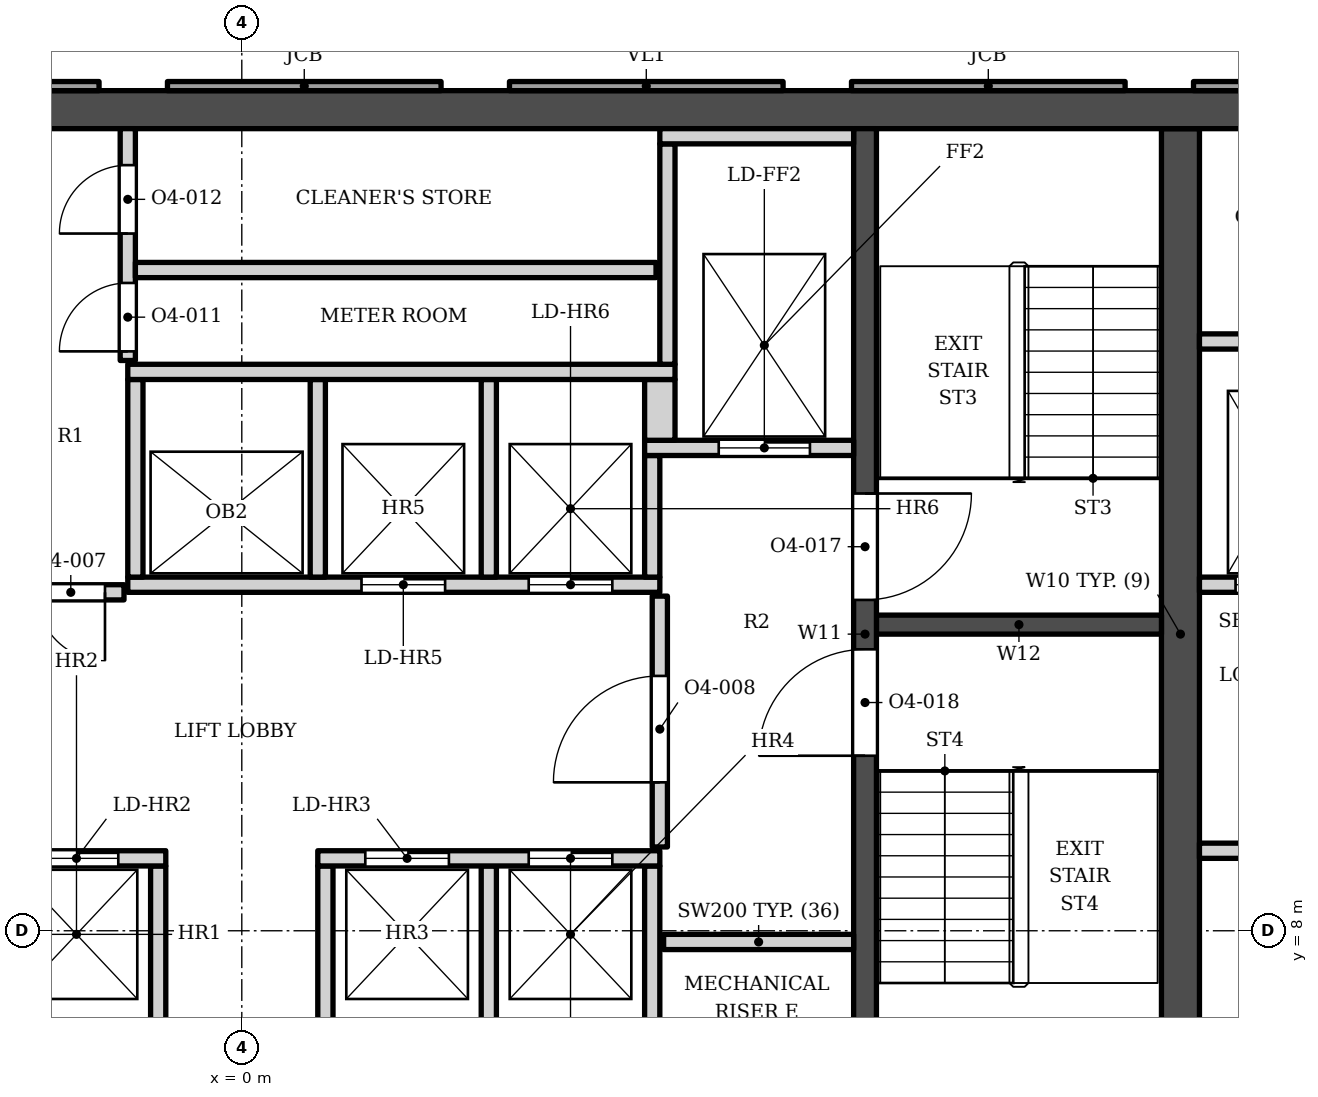
"""IFC4 building model, lengths in metres.
Left out: names, types, materials, properties, quantities, classifications, styles, units other than length and angle.
Written with IfcOpenShell. Run it as: python <this file> out.ifc"""

import sys

from ifc_helpers import new_model, si_unit, direction, frame, frame_2d, origin, place, context, subcontext, project, spatial, polyline, rectangle, outline, extrude, element, fill, save


model = new_model("IFC4")
c1 = context("Model", 3, precision=1e-05, world=origin(), true_north=direction((0.0, 1.0)))
c2 = subcontext(c1, "Body", "Model", "MODEL_VIEW")
j1 = project(units=[si_unit("LENGTHUNIT", "METRE"), si_unit("PLANEANGLEUNIT", "RADIAN")], contexts=[c1])
p1 = place(None, origin())
s1 = spatial("IfcSite", under=j1, at=p1, CompositionType="ELEMENT")
p2 = place(p1, origin())
s2 = spatial("IfcBuilding", under=s1, at=p2, CompositionType="ELEMENT")
p3 = place(p2, frame((0.0, 0.0, 179.7)))
s3 = spatial("IfcBuildingStorey", under=s2, at=p3, CompositionType="ELEMENT", Elevation=179.7)
p4 = place(p3, frame((-15.1, 18.802, 0.0), z_axis=(0.0, 0.0, 1.0), x_axis=(1.0, 0.0, 0.0)))
e1 = element("IfcWall", 1, at=p4, inside=s3, PredefinedType="SHEAR", context=c2, shape_type="SweptSolid", body=[
    extrude(rectangle(XDim=30.2, YDim=0.5, at=frame_2d((15.1, 0.0))), origin(), (0.0, 0.0, 1.0), 3.9),
])
p5 = place(p3, frame((12.35, 5.253, 0.0), z_axis=(0.0, 0.0, 1.0), x_axis=(0.0, 1.0, 0.0)))
e2 = element("IfcWall", 2, at=p5, inside=s3, PredefinedType="SHEAR", context=c2, shape_type="SweptSolid", body=[
    extrude(rectangle(XDim=13.3, YDim=0.5, at=frame_2d((6.65, 0.0))), origin(), (0.0, 0.0, 1.0), 3.9),
])
p6 = place(p3, frame((8.2, 5.253, 0.0), z_axis=(0.0, 0.0, 1.0), x_axis=(0.0, 1.0, 0.0)))
e3 = element("IfcWall", 3, at=p6, inside=s3, PredefinedType="SHEAR", context=c2, shape_type="SweptSolid", body=[
    extrude(rectangle(XDim=13.3, YDim=0.3, at=frame_2d((6.65, 0.0))), origin(), (0.0, 0.0, 1.0), 3.9),
])
p7 = place(p6, frame((7.1, 0.0, 0.0)))
e4 = element("IfcOpeningElement", 4, at=p7, cuts=e3, PredefinedType="OPENING", context=c2, shape_type="SweptSolid", body=[
    extrude(rectangle(XDim=1.4, YDim=2.1, at=frame_2d((0.7, 1.05))), frame((0.0, 0.16, 0.0), z_axis=(0.0, -1.0, 0.0), x_axis=(1.0, 0.0, 0.0)), (0.0, 0.0, 1.0), 0.32),
])
p8 = place(p6, frame((5.05, 0.0, 0.0)))
e5 = element("IfcOpeningElement", 5, at=p8, cuts=e3, PredefinedType="OPENING", context=c2, shape_type="SweptSolid", body=[
    extrude(rectangle(XDim=1.4, YDim=2.1, at=frame_2d((0.7, 1.05))), frame((0.0, 0.16, 0.0), z_axis=(0.0, -1.0, 0.0), x_axis=(1.0, 0.0, 0.0)), (0.0, 0.0, 1.0), 0.32),
])
p9 = place(p3, frame((8.35, 12.028, 0.0), z_axis=(0.0, 0.0, 1.0), x_axis=(1.0, 0.0, 0.0)))
e6 = element("IfcWall", 6, at=p9, inside=s3, PredefinedType="SHEAR", context=c2, shape_type="SweptSolid", body=[
    extrude(rectangle(XDim=3.75, YDim=0.25, at=frame_2d((1.875, 0.0))), origin(), (0.0, 0.0, 1.0), 3.9),
])
p10 = place(p3, origin())
e7 = element("IfcWall", 7, at=p10, inside=s3, PredefinedType="ELEMENTEDWALL", context=c2, shape_type="SweptSolid", body=[
    extrude(outline(polyline([(12.522, 19.173), (12.522, 19.052), (16.121, 19.052), (16.121, 19.173), (12.522, 19.173)])), origin(), (0.0, 0.0, 1.0), 3.0),
])
p11 = place(p3, origin())
e8 = element("IfcWall", 8, at=p11, inside=s3, PredefinedType="SOLIDWALL", context=c2, shape_type="SweptSolid", body=[
    extrude(outline(polyline([(8.022, 19.173), (8.022, 19.052), (11.622, 19.052), (11.622, 19.173), (8.022, 19.173)])), origin(), (0.0, 0.0, 1.0), 3.0),
])
p12 = place(p3, origin())
e9 = element("IfcWall", 9, at=p12, inside=s3, PredefinedType="ELEMENTEDWALL", context=c2, shape_type="SweptSolid", body=[
    extrude(outline(polyline([(3.522, 19.173), (3.522, 19.052), (7.122, 19.052), (7.122, 19.173), (3.522, 19.173)])), origin(), (0.0, 0.0, 1.0), 3.0),
])
p13 = place(p3, origin())
e10 = element("IfcWall", 10, at=p13, inside=s3, PredefinedType="SOLIDWALL", context=c2, shape_type="SweptSolid", body=[
    extrude(outline(polyline([(-0.978, 19.173), (-0.978, 19.052), (2.622, 19.052), (2.622, 19.173), (-0.978, 19.173)])), origin(), (0.0, 0.0, 1.0), 3.0),
])
p14 = place(p3, origin())
e11 = element("IfcWall", 11, at=p14, inside=s3, PredefinedType="ELEMENTEDWALL", context=c2, shape_type="SweptSolid", body=[
    extrude(outline(polyline([(-5.478, 19.173), (-5.478, 19.052), (-1.878, 19.052), (-1.878, 19.173), (-5.478, 19.173)])), origin(), (0.0, 0.0, 1.0), 3.0),
])
for number, where, z_axis, x_axis in (
    (12, (-1.1, 6.353, 0.0), (0.0, 0.0, 1.0), (0.0, 1.0, 0.0)),
    (13, (1.1, 6.353, 0.0), (0.0, 0.0, 1.0), (0.0, 1.0, 0.0)),
    (14, (3.25, 6.353, 0.0), (0.0, 0.0, 1.0), (0.0, 1.0, 0.0)),
    (15, (5.4, 6.353, 0.0), (0.0, 0.0, 1.0), (0.0, 1.0, 0.0)),
    (16, (5.55, 7.853, 0.0), (0.0, 0.0, 1.0), (1.0, 0.0, 0.0)),
):
    element("IfcWall", number, at=place(p3, frame(where, z_axis=z_axis, x_axis=x_axis)), inside=s3, PredefinedType="SOLIDWALL", context=c2, shape_type="SweptSolid", body=[
        extrude(rectangle(XDim=2.5, YDim=0.2, at=frame_2d((1.25, 0.0))), origin(), (0.0, 0.0, 1.0), 3.73),
    ])
p15 = place(p3, frame((-5.5, 8.953, 0.0), z_axis=(0.0, 0.0, 1.0), x_axis=(1.0, 0.0, 0.0)))
e17 = element("IfcWall", 17, at=p15, inside=s3, PredefinedType="SOLIDWALL", context=c2, shape_type="SweptSolid", body=[
    extrude(rectangle(XDim=4.5, YDim=0.2, at=frame_2d((2.25, 0.0))), origin(), (0.0, 0.0, 1.0), 3.73),
])
p16 = place(p15, frame((0.625, 0.0, 0.0)))
e18 = element("IfcOpeningElement", 18, at=p16, cuts=e17, PredefinedType="OPENING", context=c2, shape_type="SweptSolid", body=[
    extrude(rectangle(XDim=1.1, YDim=2.1, at=frame_2d((0.55, 1.05))), frame((0.0, 0.11, 0.0), z_axis=(0.0, -1.0, 0.0), x_axis=(1.0, 0.0, 0.0)), (0.0, 0.0, 1.0), 0.22),
])
p17 = place(p15, frame((2.775, 0.0, 0.0)))
e19 = element("IfcOpeningElement", 19, at=p17, cuts=e17, PredefinedType="OPENING", context=c2, shape_type="SweptSolid", body=[
    extrude(rectangle(XDim=1.1, YDim=2.1, at=frame_2d((0.55, 1.05))), frame((0.0, 0.11, 0.0), z_axis=(0.0, -1.0, 0.0), x_axis=(1.0, 0.0, 0.0)), (0.0, 0.0, 1.0), 0.22),
])
p18 = place(p3, frame((1.0, 8.953, 0.0), z_axis=(0.0, 0.0, 1.0), x_axis=(1.0, 0.0, 0.0)))
e20 = element("IfcWall", 20, at=p18, inside=s3, PredefinedType="SOLIDWALL", context=c2, shape_type="SweptSolid", body=[
    extrude(rectangle(XDim=4.5, YDim=0.2, at=frame_2d((2.25, 0.0))), origin(), (0.0, 0.0, 1.0), 3.73),
])
p19 = place(p18, frame((0.625, 0.0, 0.0)))
e21 = element("IfcOpeningElement", 21, at=p19, cuts=e20, PredefinedType="OPENING", context=c2, shape_type="SweptSolid", body=[
    extrude(rectangle(XDim=1.1, YDim=2.1, at=frame_2d((0.55, 1.05))), frame((0.0, 0.11, 0.0), z_axis=(0.0, -1.0, 0.0), x_axis=(1.0, 0.0, 0.0)), (0.0, 0.0, 1.0), 0.22),
])
p20 = place(p18, frame((2.775, 0.0, 0.0)))
e22 = element("IfcOpeningElement", 22, at=p20, cuts=e20, PredefinedType="OPENING", context=c2, shape_type="SweptSolid", body=[
    extrude(rectangle(XDim=1.1, YDim=2.1, at=frame_2d((0.55, 1.05))), frame((0.0, 0.11, 0.0), z_axis=(0.0, -1.0, 0.0), x_axis=(1.0, 0.0, 0.0)), (0.0, 0.0, 1.0), 0.22),
])
p21 = place(p3, frame((12.6, 9.052, 0.0), z_axis=(0.0, 0.0, 1.0), x_axis=(1.0, 0.0, 0.0)))
e23 = element("IfcWall", 23, at=p21, inside=s3, PredefinedType="PARTITIONING", context=c2, shape_type="SweptSolid", body=[
    extrude(rectangle(XDim=2.5, YDim=0.2, at=frame_2d((1.25, 0.0))), origin(), (0.0, 0.0, 1.0), 3.73),
])
p22 = place(p3, frame((5.5, 9.103, 0.0), z_axis=(0.0, 0.0, 1.0), x_axis=(0.0, 1.0, 0.0)))
e24 = element("IfcWall", 24, at=p22, inside=s3, PredefinedType="SOLIDWALL", context=c2, shape_type="SweptSolid", body=[
    extrude(rectangle(XDim=3.3, YDim=0.2, at=frame_2d((1.65, 0.0))), origin(), (0.0, 0.0, 1.0), 3.73),
])
p23 = place(p22, frame((0.85, 0.0, 0.0)))
e25 = element("IfcOpeningElement", 25, at=p23, cuts=e24, PredefinedType="OPENING", context=c2, shape_type="SweptSolid", body=[
    extrude(rectangle(XDim=1.4, YDim=2.1, at=frame_2d((0.7, 1.05))), frame((0.0, 0.11, 0.0), z_axis=(0.0, -1.0, 0.0), x_axis=(1.0, 0.0, 0.0)), (0.0, 0.0, 1.0), 0.22),
])
p24 = place(p3, frame((-2.95, 12.453, 0.0), z_axis=(0.0, 0.0, 1.0), x_axis=(1.0, 0.0, 0.0)))
e26 = element("IfcWall", 26, at=p24, inside=s3, PredefinedType="SOLIDWALL", context=c2, shape_type="SweptSolid", body=[
    extrude(rectangle(XDim=1.4, YDim=0.2, at=frame_2d((0.7, 0.0))), origin(), (0.0, 0.0, 1.0), 3.73),
])
p25 = place(p24, frame((0.25, 0.0, 0.0)))
e27 = element("IfcOpeningElement", 27, at=p25, cuts=e26, PredefinedType="OPENING", context=c2, shape_type="SweptSolid", body=[
    extrude(rectangle(XDim=0.9, YDim=2.1, at=frame_2d((0.45, 1.05))), frame((0.0, 0.11, 0.0), z_axis=(0.0, -1.0, 0.0), x_axis=(1.0, 0.0, 0.0)), (0.0, 0.0, 1.0), 0.22),
])
p26 = place(p3, frame((-1.5, 12.552, 0.0), z_axis=(0.0, 0.0, 1.0), x_axis=(1.0, 0.0, 0.0)))
e28 = element("IfcWall", 28, at=p26, inside=s3, PredefinedType="SOLIDWALL", context=c2, shape_type="SweptSolid", body=[
    extrude(rectangle(XDim=7.0, YDim=0.2, at=frame_2d((3.5, 0.0))), origin(), (0.0, 0.0, 1.0), 3.73),
])
p27 = place(p26, frame((3.075, 0.0, 0.0)))
e29 = element("IfcOpeningElement", 29, at=p27, cuts=e28, PredefinedType="OPENING", context=c2, shape_type="SweptSolid", body=[
    extrude(rectangle(XDim=1.1, YDim=2.1, at=frame_2d((0.55, 1.05))), frame((0.0, 0.11, 0.0), z_axis=(0.0, -1.0, 0.0), x_axis=(1.0, 0.0, 0.0)), (0.0, 0.0, 1.0), 0.22),
])
p28 = place(p26, frame((5.275, 0.0, 0.0)))
e30 = element("IfcOpeningElement", 30, at=p28, cuts=e28, PredefinedType="OPENING", context=c2, shape_type="SweptSolid", body=[
    extrude(rectangle(XDim=1.1, YDim=2.1, at=frame_2d((0.55, 1.05))), frame((0.0, 0.11, 0.0), z_axis=(0.0, -1.0, 0.0), x_axis=(1.0, 0.0, 0.0)), (0.0, 0.0, 1.0), 0.22),
])
p29 = place(p3, frame((12.6, 12.552, 0.0), z_axis=(0.0, 0.0, 1.0), x_axis=(1.0, 0.0, 0.0)))
e31 = element("IfcWall", 31, at=p29, inside=s3, PredefinedType="SOLIDWALL", context=c2, shape_type="SweptSolid", body=[
    extrude(rectangle(XDim=2.15, YDim=0.2, at=frame_2d((1.075, 0.0))), origin(), (0.0, 0.0, 1.0), 3.73),
])
p30 = place(p29, frame((0.475, 0.0, 0.0)))
e32 = element("IfcOpeningElement", 32, at=p30, cuts=e31, PredefinedType="OPENING", context=c2, shape_type="SweptSolid", body=[
    extrude(rectangle(XDim=1.2, YDim=2.1, at=frame_2d((0.6, 1.05))), frame((0.0, 0.11, 0.0), z_axis=(0.0, -1.0, 0.0), x_axis=(1.0, 0.0, 0.0)), (0.0, 0.0, 1.0), 0.22),
])
for number, where, z_axis, x_axis in (
    (33, (-1.4, 12.653, 0.0), (0.0, 0.0, 1.0), (0.0, 1.0, 0.0)),
    (34, (1.0, 12.653, 0.0), (0.0, 0.0, 1.0), (0.0, 1.0, 0.0)),
    (35, (3.25, 12.653, 0.0), (0.0, 0.0, 1.0), (0.0, 1.0, 0.0)),
):
    element("IfcWall", number, at=place(p3, frame(where, z_axis=z_axis, x_axis=x_axis)), inside=s3, PredefinedType="SOLIDWALL", context=c2, shape_type="SweptSolid", body=[
        extrude(rectangle(XDim=2.6, YDim=0.2, at=frame_2d((1.3, 0.0))), origin(), (0.0, 0.0, 1.0), 3.73),
    ])
p31 = place(p3, frame((5.4, 12.653, 0.0), z_axis=(0.0, 0.0, 1.0), x_axis=(0.0, 1.0, 0.0)))
e36 = element("IfcWall", 36, at=p31, inside=s3, PredefinedType="SOLIDWALL", context=c2, shape_type="SweptSolid", body=[
    extrude(rectangle(XDim=1.6, YDim=0.2, at=frame_2d((0.8, 0.0))), origin(), (0.0, 0.0, 1.0), 3.73),
])
p32 = place(p3, frame((5.3, 14.353, 0.0), z_axis=(0.0, 0.0, 1.0), x_axis=(1.0, 0.0, 0.0)))
e37 = element("IfcWall", 37, at=p32, inside=s3, PredefinedType="SOLIDWALL", context=c2, shape_type="SweptSolid", body=[
    extrude(rectangle(XDim=2.75, YDim=0.2, at=frame_2d((1.375, 0.0))), origin(), (0.0, 0.0, 1.0), 3.73),
])
p33 = place(p32, frame((0.975, 0.0, 0.0)))
e38 = element("IfcOpeningElement", 38, at=p33, cuts=e37, PredefinedType="OPENING", context=c2, shape_type="SweptSolid", body=[
    extrude(rectangle(XDim=1.2, YDim=2.1, at=frame_2d((0.6, 1.05))), frame((0.0, 0.11, 0.0), z_axis=(0.0, -1.0, 0.0), x_axis=(1.0, 0.0, 0.0)), (0.0, 0.0, 1.0), 0.22),
])
p34 = place(p3, frame((5.5, 14.453, 0.0), z_axis=(0.0, 0.0, 1.0), x_axis=(0.0, 1.0, 0.0)))
e39 = element("IfcWall", 39, at=p34, inside=s3, PredefinedType="SOLIDWALL", context=c2, shape_type="SweptSolid", body=[
    extrude(rectangle(XDim=0.8, YDim=0.4, at=frame_2d((0.4, 0.0))), origin(), (0.0, 0.0, 1.0), 3.73),
])
p35 = place(p3, frame((-1.5, 15.353, 0.0), z_axis=(0.0, 0.0, 1.0), x_axis=(1.0, 0.0, 0.0)))
e40 = element("IfcWall", 40, at=p35, inside=s3, PredefinedType="SOLIDWALL", context=c2, shape_type="SweptSolid", body=[
    extrude(rectangle(XDim=7.2, YDim=0.2, at=frame_2d((3.6, 0.0))), origin(), (0.0, 0.0, 1.0), 3.73),
])
p36 = place(p3, frame((5.6, 15.453, 0.0), z_axis=(0.0, 0.0, 1.0), x_axis=(0.0, 1.0, 0.0)))
e41 = element("IfcWall", 41, at=p36, inside=s3, PredefinedType="SOLIDWALL", context=c2, shape_type="SweptSolid", body=[
    extrude(rectangle(XDim=2.9, YDim=0.2, at=frame_2d((1.45, 0.0))), origin(), (0.0, 0.0, 1.0), 3.73),
])
p37 = place(p3, frame((-1.5, 15.503, 0.0), z_axis=(0.0, 0.0, 1.0), x_axis=(0.0, 1.0, 0.0)))
e42 = element("IfcWall", 42, at=p37, inside=s3, PredefinedType="SOLIDWALL", context=c2, shape_type="SweptSolid", body=[
    extrude(rectangle(XDim=3.05, YDim=0.2, at=frame_2d((1.525, 0.0))), origin(), (0.0, 0.0, 1.0), 3.73),
])
p38 = place(p37, frame((0.12, 0.0, 0.0)))
e43 = element("IfcOpeningElement", 43, at=p38, cuts=e42, PredefinedType="OPENING", context=c2, shape_type="SweptSolid", body=[
    extrude(rectangle(XDim=0.9, YDim=2.1, at=frame_2d((0.45, 1.05))), frame((0.0, 0.11, 0.0), z_axis=(0.0, -1.0, 0.0), x_axis=(1.0, 0.0, 0.0)), (0.0, 0.0, 1.0), 0.22),
])
p39 = place(p37, frame((1.67, 0.0, 0.0)))
e44 = element("IfcOpeningElement", 44, at=p39, cuts=e42, PredefinedType="OPENING", context=c2, shape_type="SweptSolid", body=[
    extrude(rectangle(XDim=0.9, YDim=2.1, at=frame_2d((0.45, 1.05))), frame((0.0, 0.11, 0.0), z_axis=(0.0, -1.0, 0.0), x_axis=(1.0, 0.0, 0.0)), (0.0, 0.0, 1.0), 0.22),
])
p40 = place(p3, frame((12.6, 15.753, 0.0), z_axis=(0.0, 0.0, 1.0), x_axis=(1.0, 0.0, 0.0)))
e45 = element("IfcWall", 45, at=p40, inside=s3, PredefinedType="SOLIDWALL", context=c2, shape_type="SweptSolid", body=[
    extrude(rectangle(XDim=2.15, YDim=0.2, at=frame_2d((1.075, 0.0))), origin(), (0.0, 0.0, 1.0), 3.73),
])
p41 = place(p3, frame((-1.4, 16.693, 0.0), z_axis=(0.0, 0.0, 1.0), x_axis=(1.0, 0.0, 0.0)))
e46 = element("IfcWall", 46, at=p41, inside=s3, PredefinedType="SOLIDWALL", context=c2, shape_type="SweptSolid", body=[
    extrude(rectangle(XDim=6.85, YDim=0.2, at=frame_2d((3.425, 0.0))), origin(), (0.0, 0.0, 1.0), 3.73),
])
p42 = place(p3, frame((5.5, 18.453, 0.0), z_axis=(0.0, 0.0, 1.0), x_axis=(1.0, 0.0, 0.0)))
e47 = element("IfcWall", 47, at=p42, inside=s3, PredefinedType="SOLIDWALL", context=c2, shape_type="SweptSolid", body=[
    extrude(rectangle(XDim=2.55, YDim=0.2, at=frame_2d((1.275, 0.0))), origin(), (0.0, 0.0, 1.0), 3.73),
])
p43 = place(p17, origin())
e48 = element("IfcDoor", 48, at=p43, inside=s3, OperationType="DOUBLE_DOOR_SLIDING", PredefinedType="DOOR", context=c2, shape_type="SweptSolid", body=[
    extrude(rectangle(XDim=1.1, YDim=2.1, at=frame_2d((0.55, 1.05))), frame((0.0, 0.025, 0.0), z_axis=(0.0, -1.0, 0.0), x_axis=(1.0, 0.0, 0.0)), (0.0, 0.0, 1.0), 0.05),
])
fill(e19, e48)
p44 = place(p19, origin())
e49 = element("IfcDoor", 49, at=p44, inside=s3, OperationType="DOUBLE_DOOR_SLIDING", PredefinedType="DOOR", context=c2, shape_type="SweptSolid", body=[
    extrude(rectangle(XDim=1.1, YDim=2.1, at=frame_2d((0.55, 1.05))), frame((0.0, 0.025, 0.0), z_axis=(0.0, -1.0, 0.0), x_axis=(1.0, 0.0, 0.0)), (0.0, 0.0, 1.0), 0.05),
])
fill(e21, e49)
p45 = place(p20, origin())
e50 = element("IfcDoor", 50, at=p45, inside=s3, OperationType="DOUBLE_DOOR_SLIDING", PredefinedType="DOOR", context=c2, shape_type="SweptSolid", body=[
    extrude(rectangle(XDim=1.1, YDim=2.1, at=frame_2d((0.55, 1.05))), frame((0.0, 0.025, 0.0), z_axis=(0.0, -1.0, 0.0), x_axis=(1.0, 0.0, 0.0)), (0.0, 0.0, 1.0), 0.05),
])
fill(e22, e50)
p46 = place(p27, origin())
e51 = element("IfcDoor", 51, at=p46, inside=s3, OperationType="DOUBLE_DOOR_SLIDING", PredefinedType="DOOR", context=c2, shape_type="SweptSolid", body=[
    extrude(rectangle(XDim=1.1, YDim=2.1, at=frame_2d((0.55, 1.05))), frame((0.0, 0.025, 0.0), z_axis=(0.0, -1.0, 0.0), x_axis=(1.0, 0.0, 0.0)), (0.0, 0.0, 1.0), 0.05),
])
fill(e29, e51)
p47 = place(p28, origin())
e52 = element("IfcDoor", 52, at=p47, inside=s3, OperationType="DOUBLE_DOOR_SLIDING", PredefinedType="DOOR", context=c2, shape_type="SweptSolid", body=[
    extrude(rectangle(XDim=1.1, YDim=2.1, at=frame_2d((0.55, 1.05))), frame((0.0, 0.025, 0.0), z_axis=(0.0, -1.0, 0.0), x_axis=(1.0, 0.0, 0.0)), (0.0, 0.0, 1.0), 0.05),
])
fill(e30, e52)
p48 = place(p33, origin())
e53 = element("IfcDoor", 53, at=p48, inside=s3, OperationType="DOUBLE_DOOR_SLIDING", PredefinedType="DOOR", context=c2, shape_type="SweptSolid", body=[
    extrude(rectangle(XDim=1.2, YDim=2.1, at=frame_2d((0.6, 1.05))), frame((0.0, 0.025, 0.0), z_axis=(0.0, -1.0, 0.0), x_axis=(1.0, 0.0, 0.0)), (0.0, 0.0, 1.0), 0.05),
])
fill(e38, e53)
p49 = place(p30, origin())
e54 = element("IfcDoor", 54, at=p49, inside=s3, OperationType="DOUBLE_DOOR_SLIDING", PredefinedType="DOOR", context=c2, shape_type="SweptSolid", body=[
    extrude(rectangle(XDim=1.2, YDim=2.1, at=frame_2d((0.6, 1.05))), frame((0.0, 0.025, 0.0), z_axis=(0.0, -1.0, 0.0), x_axis=(1.0, 0.0, 0.0)), (0.0, 0.0, 1.0), 0.05),
])
fill(e32, e54)
p50 = place(p7, origin())
e55 = element("IfcDoor", 55, at=p50, inside=s3, OperationType="SINGLE_SWING_RIGHT", PredefinedType="DOOR", context=c2, shape_type="SweptSolid", body=[
    extrude(rectangle(XDim=1.4, YDim=2.1, at=frame_2d((0.7, 1.05))), frame((0.0, 0.025, 0.0), z_axis=(0.0, -1.0, 0.0), x_axis=(1.0, 0.0, 0.0)), (0.0, 0.0, 1.0), 0.05),
])
fill(e4, e55)
p51 = place(p8, origin())
e56 = element("IfcDoor", 56, at=p51, inside=s3, OperationType="SINGLE_SWING_LEFT", PredefinedType="DOOR", context=c2, shape_type="SweptSolid", body=[
    extrude(rectangle(XDim=1.4, YDim=2.1, at=frame_2d((0.7, 1.05))), frame((0.0, 0.025, 0.0), z_axis=(0.0, -1.0, 0.0), x_axis=(1.0, 0.0, 0.0)), (0.0, 0.0, 1.0), 0.05),
])
fill(e5, e56)
p52 = place(p25, origin())
e57 = element("IfcDoor", 57, at=p52, inside=s3, OperationType="SINGLE_SWING_RIGHT", PredefinedType="DOOR", context=c2, shape_type="SweptSolid", body=[
    extrude(rectangle(XDim=0.9, YDim=2.1, at=frame_2d((0.45, 1.05))), frame((0.0, 0.025, 0.0), z_axis=(0.0, -1.0, 0.0), x_axis=(1.0, 0.0, 0.0)), (0.0, 0.0, 1.0), 0.05),
])
fill(e27, e57)
p53 = place(p23, origin())
e58 = element("IfcDoor", 58, at=p53, inside=s3, OperationType="SINGLE_SWING_LEFT", PredefinedType="DOOR", context=c2, shape_type="SweptSolid", body=[
    extrude(rectangle(XDim=1.4, YDim=2.1, at=frame_2d((0.7, 1.05))), frame((0.0, 0.025, 0.0), z_axis=(0.0, -1.0, 0.0), x_axis=(1.0, 0.0, 0.0)), (0.0, 0.0, 1.0), 0.05),
])
fill(e25, e58)
p54 = place(p38, origin())
e59 = element("IfcDoor", 59, at=p54, inside=s3, OperationType="SINGLE_SWING_LEFT", PredefinedType="DOOR", context=c2, shape_type="SweptSolid", body=[
    extrude(rectangle(XDim=0.9, YDim=2.1, at=frame_2d((0.45, 1.05))), frame((0.0, 0.025, 0.0), z_axis=(0.0, -1.0, 0.0), x_axis=(1.0, 0.0, 0.0)), (0.0, 0.0, 1.0), 0.05),
])
fill(e43, e59)
p55 = place(p39, origin())
e60 = element("IfcDoor", 60, at=p55, inside=s3, OperationType="SINGLE_SWING_LEFT", PredefinedType="DOOR", context=c2, shape_type="SweptSolid", body=[
    extrude(rectangle(XDim=0.9, YDim=2.1, at=frame_2d((0.45, 1.05))), frame((0.0, 0.025, 0.0), z_axis=(0.0, -1.0, 0.0), x_axis=(1.0, 0.0, 0.0)), (0.0, 0.0, 1.0), 0.05),
])
fill(e44, e60)
save(model, sys.argv[1])
